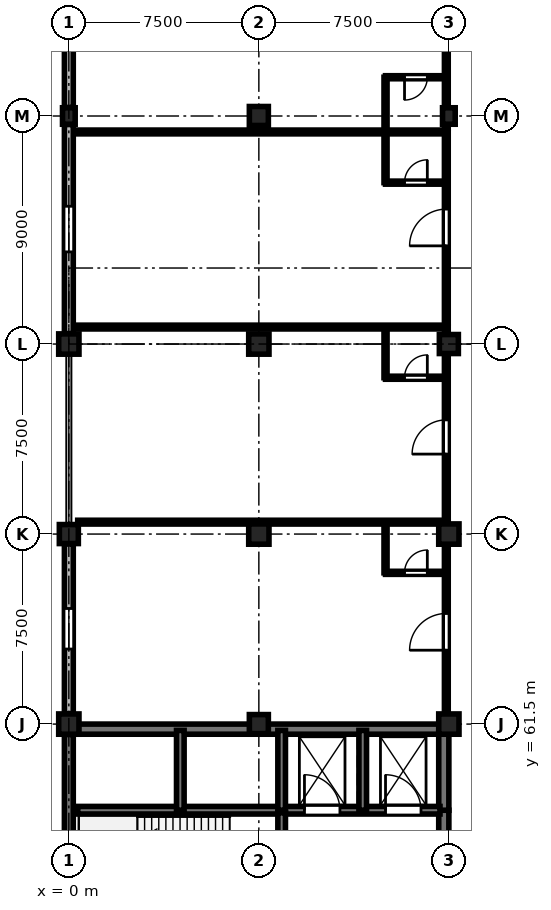
"""IFC4 building model, lengths in metres.
Left out: names, types, materials, properties, quantities, classifications, styles, units other than length and angle.
Written with IfcOpenShell. Run it as: python <this file> out.ifc"""

import sys

from ifc_helpers import new_model, si_unit, direction, frame, frame_2d, origin, origin_2d, place, context, subcontext, project, spatial, rectangle, circle, extrude, element, fill, save


model = new_model("IFC4")
c1 = context("Model", 3, precision=1e-05, world=origin(), true_north=direction((0.0, 1.0)))
c2 = subcontext(c1, "Body", "Model", "MODEL_VIEW")
j1 = project(units=[si_unit("LENGTHUNIT", "METRE"), si_unit("PLANEANGLEUNIT", "RADIAN")], contexts=[c1])
p1 = place(None, origin())
s1 = spatial("IfcSite", under=j1, at=p1, CompositionType="ELEMENT")
p2 = place(p1, origin())
s2 = spatial("IfcBuilding", under=s1, at=p2, CompositionType="ELEMENT")
p3 = place(p2, frame((0.0, 0.0, 9.3)))
s3 = spatial("IfcBuildingStorey", under=s2, at=p3, CompositionType="ELEMENT", Elevation=9.3)
p4 = place(p3, frame((0.0, 61.5, 0.0), z_axis=(0.0, 0.0, 1.0), x_axis=(1.0, 0.0, 0.0)))
e1 = element("IfcColumn", 1, at=p4, inside=s3, PredefinedType="COLUMN", context=c2, shape_type="SweptSolid", body=[
    extrude(rectangle(XDim=0.8, YDim=0.8, at=origin_2d()), origin(), (0.0, 0.0, 1.0), 4.8),
])
p5 = place(p3, frame((0.0, 69.0, 0.0), z_axis=(0.0, 0.0, 1.0), x_axis=(1.0, 0.0, 0.0)))
e2 = element("IfcColumn", 2, at=p5, inside=s3, PredefinedType="COLUMN", context=c2, shape_type="SweptSolid", body=[
    extrude(circle(Radius=0.375, at=origin_2d()), origin(), (0.0, 0.0, 1.0), 4.8),
])
p6 = place(p3, frame((0.0, 76.5, 0.0), z_axis=(0.0, 0.0, 1.0), x_axis=(1.0, 0.0, 0.0)))
e3 = element("IfcColumn", 3, at=p6, inside=s3, PredefinedType="COLUMN", context=c2, shape_type="SweptSolid", body=[
    extrude(rectangle(XDim=0.8, YDim=0.8, at=origin_2d()), origin(), (0.0, 0.0, 1.0), 4.8),
])
p7 = place(p3, frame((0.0, 85.5, 0.0), z_axis=(0.0, 0.0, 1.0), x_axis=(1.0, 0.0, 0.0)))
e4 = element("IfcColumn", 4, at=p7, inside=s3, PredefinedType="COLUMN", context=c2, shape_type="SweptSolid", body=[
    extrude(rectangle(XDim=0.5, YDim=0.65, at=origin_2d()), origin(), (0.0, 0.0, 1.0), 4.8),
])
p8 = place(p3, frame((7.5, 61.5, 0.0), z_axis=(0.0, 0.0, 1.0), x_axis=(1.0, 0.0, 0.0)))
e5 = element("IfcColumn", 5, at=p8, inside=s3, PredefinedType="COLUMN", context=c2, shape_type="SweptSolid", body=[
    extrude(circle(Radius=0.375, at=origin_2d()), origin(), (0.0, 0.0, 1.0), 4.8),
])
for number, where, z_axis, x_axis in (
    (6, (7.5, 69.0, 0.0), (0.0, 0.0, 1.0), (1.0, 0.0, 0.0)),
    (7, (7.5, 76.5, 0.0), (0.0, 0.0, 1.0), (1.0, 0.0, 0.0)),
):
    element("IfcColumn", number, at=place(p3, frame(where, z_axis=z_axis, x_axis=x_axis)), inside=s3, PredefinedType="COLUMN", context=c2, shape_type="SweptSolid", body=[
        extrude(rectangle(XDim=0.8, YDim=0.8, at=origin_2d()), origin(), (0.0, 0.0, 1.0), 4.8),
    ])
p9 = place(p3, frame((7.5, 85.5, 0.0), z_axis=(0.0, 0.0, 1.0), x_axis=(1.0, 0.0, 0.0)))
e8 = element("IfcColumn", 8, at=p9, inside=s3, PredefinedType="COLUMN", context=c2, shape_type="SweptSolid", body=[
    extrude(rectangle(XDim=0.75, YDim=0.75, at=origin_2d()), origin(), (0.0, 0.0, 1.0), 4.8),
])
for number, where, z_axis, x_axis in (
    (9, (15.0, 61.5, 0.0), (0.0, 0.0, 1.0), (1.0, 0.0, 0.0)),
    (10, (15.0, 69.0, 0.0), (0.0, 0.0, 1.0), (1.0, 0.0, 0.0)),
):
    element("IfcColumn", number, at=place(p3, frame(where, z_axis=z_axis, x_axis=x_axis)), inside=s3, PredefinedType="COLUMN", context=c2, shape_type="SweptSolid", body=[
        extrude(rectangle(XDim=0.8, YDim=0.8, at=origin_2d()), origin(), (0.0, 0.0, 1.0), 4.8),
    ])
p10 = place(p3, frame((15.0, 76.5, 0.0), z_axis=(0.0, 0.0, 1.0), x_axis=(1.0, 0.0, 0.0)))
e11 = element("IfcColumn", 11, at=p10, inside=s3, PredefinedType="COLUMN", context=c2, shape_type="SweptSolid", body=[
    extrude(circle(Radius=0.375, at=origin_2d()), origin(), (0.0, 0.0, 1.0), 4.8),
])
p11 = place(p3, frame((15.0, 85.5, 0.0), z_axis=(0.0, 0.0, 1.0), x_axis=(1.0, 0.0, 0.0)))
e12 = element("IfcColumn", 12, at=p11, inside=s3, PredefinedType="COLUMN", context=c2, shape_type="SweptSolid", body=[
    extrude(rectangle(XDim=0.5, YDim=0.65, at=origin_2d()), origin(), (0.0, 0.0, 1.0), 4.8),
])
p12 = place(p3, frame((0.0, 54.41, 0.0), z_axis=(0.0, 0.0, 1.0), x_axis=(0.0, 1.0, 0.0)))
e13 = element("IfcWall", 13, at=p12, inside=s3, PredefinedType="SHEAR", context=c2, shape_type="SweptSolid", body=[
    extrude(rectangle(XDim=6.68, YDim=0.35, at=frame_2d((3.34, 0.0))), origin(), (0.0, 0.0, 1.0), 4.55),
])
p13 = place(p3, frame((0.0, 61.91, 0.0), z_axis=(0.0, 0.0, 1.0), x_axis=(0.0, 1.0, 0.0)))
e14 = element("IfcWall", 14, at=p13, inside=s3, PredefinedType="STANDARD", context=c2, shape_type="SweptSolid", body=[
    extrude(rectangle(XDim=6.705, YDim=0.35, at=frame_2d((3.353, 0.0))), origin(), (0.0, 0.0, 1.0), 3.95),
])
p14 = place(p13, frame((2.552, 0.0, 0.9)))
e15 = element("IfcOpeningElement", 15, at=p14, cuts=e14, PredefinedType="OPENING", context=c2, shape_type="SweptSolid", body=[
    extrude(rectangle(XDim=1.6, YDim=1.8, at=frame_2d((0.8, 0.9))), frame((0.0, 0.185, 0.0), z_axis=(0.0, -1.0, 0.0), x_axis=(1.0, 0.0, 0.0)), (0.0, 0.0, 1.0), 0.37),
])
p15 = place(p3, frame((0.0, 76.91, 0.0), z_axis=(0.0, 0.0, 1.0), x_axis=(0.0, 1.0, 0.0)))
e16 = element("IfcWall", 16, at=p15, inside=s3, PredefinedType="STANDARD", context=c2, shape_type="SweptSolid", body=[
    extrude(rectangle(XDim=8.255, YDim=0.35, at=frame_2d((4.127, 0.0))), origin(), (0.0, 0.0, 1.0), 4.0),
])
p16 = place(p15, frame((3.228, 0.0, 0.9)))
e17 = element("IfcOpeningElement", 17, at=p16, cuts=e16, PredefinedType="OPENING", context=c2, shape_type="SweptSolid", body=[
    extrude(rectangle(XDim=1.8, YDim=2.4, at=frame_2d((0.9, 1.2))), frame((0.0, 0.185, 0.0), z_axis=(0.0, -1.0, 0.0), x_axis=(1.0, 0.0, 0.0)), (0.0, 0.0, 1.0), 0.37),
])
p17 = place(p3, frame((0.0, 85.835, 0.0), z_axis=(0.0, 0.0, 1.0), x_axis=(0.0, 1.0, 0.0)))
e18 = element("IfcWall", 18, at=p17, inside=s3, PredefinedType="STANDARD", context=c2, shape_type="SweptSolid", body=[
    extrude(rectangle(XDim=6.805, YDim=0.35, at=frame_2d((3.402, 0.0))), origin(), (0.0, 0.0, 1.0), 3.95),
])
p18 = place(p17, frame((2.653, 0.0, 0.9)))
e19 = element("IfcOpeningElement", 19, at=p18, cuts=e18, PredefinedType="OPENING", context=c2, shape_type="SweptSolid", body=[
    extrude(rectangle(XDim=1.5, YDim=2.4, at=frame_2d((0.75, 1.2))), frame((0.0, 0.185, 0.0), z_axis=(0.0, -1.0, 0.0), x_axis=(1.0, 0.0, 0.0)), (0.0, 0.0, 1.0), 0.37),
])
p19 = place(p3, frame((0.35, 61.3, 0.0), z_axis=(0.0, 0.0, 1.0), x_axis=(1.0, 0.0, 0.0)))
e20 = element("IfcWall", 20, at=p19, inside=s3, PredefinedType="SHEAR", context=c2, shape_type="SweptSolid", body=[
    extrude(rectangle(XDim=14.3, YDim=0.4, at=frame_2d((7.15, 0.0))), origin(), (0.0, 0.0, 1.0), 4.55),
])
p20 = place(p3, frame((14.8, 54.35, 0.0), z_axis=(0.0, 0.0, 1.0), x_axis=(0.0, 1.0, 0.0)))
e21 = element("IfcWall", 21, at=p20, inside=s3, PredefinedType="SHEAR", context=c2, shape_type="SweptSolid", body=[
    extrude(rectangle(XDim=3.75, YDim=0.4, at=frame_2d((1.875, 0.0))), origin(), (0.0, 0.0, 1.0), 4.55),
])
p21 = place(p3, frame((14.8, 58.1, 0.0), z_axis=(0.0, 0.0, 1.0), x_axis=(0.0, 1.0, 0.0)))
e22 = element("IfcWall", 22, at=p21, inside=s3, PredefinedType="SHEAR", context=c2, shape_type="SweptSolid", body=[
    extrude(rectangle(XDim=3.05, YDim=0.4, at=frame_2d((1.525, 0.0))), origin(), (0.0, 0.0, 1.0), 4.55),
])
p22 = place(p3, frame((0.35, 58.1, 0.0), z_axis=(0.0, 0.0, 1.0), x_axis=(1.0, 0.0, 0.0)))
e23 = element("IfcWall", 23, at=p22, inside=s3, PredefinedType="SHEAR", context=c2, shape_type="SweptSolid", body=[
    extrude(rectangle(XDim=8.05, YDim=0.3, at=frame_2d((4.025, 0.0))), origin(), (0.0, 0.0, 1.0), 4.55),
])
p23 = place(p3, frame((8.4, 58.1, 0.0), z_axis=(0.0, 0.0, 1.0), x_axis=(1.0, 0.0, 0.0)))
e24 = element("IfcWall", 24, at=p23, inside=s3, PredefinedType="SHEAR", context=c2, shape_type="SweptSolid", body=[
    extrude(rectangle(XDim=6.25, YDim=0.3, at=frame_2d((3.125, 0.0))), origin(), (0.0, 0.0, 1.0), 4.55),
])
p24 = place(p23, frame((0.9, 0.0, 0.0)))
e25 = element("IfcOpeningElement", 25, at=p24, cuts=e24, PredefinedType="OPENING", context=c2, shape_type="SweptSolid", body=[
    extrude(rectangle(XDim=1.4, YDim=2.25, at=frame_2d((0.7, 1.125))), frame((0.0, 0.16, 0.0), z_axis=(0.0, -1.0, 0.0), x_axis=(1.0, 0.0, 0.0)), (0.0, 0.0, 1.0), 0.32),
])
p25 = place(p23, frame((4.1, 0.0, 0.0)))
e26 = element("IfcOpeningElement", 26, at=p25, cuts=e24, PredefinedType="OPENING", context=c2, shape_type="SweptSolid", body=[
    extrude(rectangle(XDim=1.4, YDim=2.25, at=frame_2d((0.7, 1.125))), frame((0.0, 0.16, 0.0), z_axis=(0.0, -1.0, 0.0), x_axis=(1.0, 0.0, 0.0)), (0.0, 0.0, 1.0), 0.32),
])
p26 = place(p3, frame((8.4, 58.0, 0.0), z_axis=(0.0, 0.0, 1.0), x_axis=(0.0, -1.0, 0.0)))
e27 = element("IfcWall", 27, at=p26, inside=s3, PredefinedType="SHEAR", context=c2, shape_type="SweptSolid", body=[
    extrude(rectangle(XDim=3.65, YDim=0.3, at=frame_2d((1.825, 0.0))), origin(), (0.0, 0.0, 1.0), 4.55),
])
p27 = place(p26, frame((1.22, 0.0, 0.0)))
e28 = element("IfcOpeningElement", 28, at=p27, cuts=e27, PredefinedType="OPENING", context=c2, shape_type="SweptSolid", body=[
    extrude(rectangle(XDim=1.2, YDim=2.25, at=frame_2d((0.6, 1.125))), frame((0.0, 0.16, 0.0), z_axis=(0.0, -1.0, 0.0), x_axis=(1.0, 0.0, 0.0)), (0.0, 0.0, 1.0), 0.32),
])
for number, where, z_axis, x_axis in (
    (29, (4.4, 58.1, 0.0), (0.0, 0.0, 1.0), (0.0, 1.0, 0.0)),
    (30, (8.4, 58.1, 0.0), (0.0, 0.0, 1.0), (0.0, 1.0, 0.0)),
    (31, (11.6, 58.1, 0.0), (0.0, 0.0, 1.0), (0.0, 1.0, 0.0)),
):
    element("IfcWall", number, at=place(p3, frame(where, z_axis=z_axis, x_axis=x_axis)), inside=s3, PredefinedType="SHEAR", context=c2, shape_type="SweptSolid", body=[
        extrude(rectangle(XDim=3.15, YDim=0.3, at=frame_2d((1.575, 0.0))), origin(), (0.0, 0.0, 1.0), 4.55),
    ])
p28 = place(p3, frame((14.9, 61.93, 0.0), z_axis=(0.0, 0.0, 1.0), x_axis=(0.0, 1.0, 0.0)))
e32 = element("IfcWall", 32, at=p28, inside=s3, PredefinedType="PARTITIONING", context=c2, shape_type="SweptSolid", body=[
    extrude(rectangle(XDim=7.54, YDim=0.15, at=frame_2d((3.77, 0.0))), origin(), (0.0, 0.0, 1.0), 3.985),
])
p29 = place(p28, frame((2.486, 0.0, 0.0)))
e33 = element("IfcOpeningElement", 33, at=p29, cuts=e32, PredefinedType="OPENING", context=c2, shape_type="SweptSolid", body=[
    extrude(rectangle(XDim=1.45, YDim=2.3, at=frame_2d((0.725, 1.15))), frame((0.0, 0.085, 0.0), z_axis=(0.0, -1.0, 0.0), x_axis=(1.0, 0.0, 0.0)), (0.0, 0.0, 1.0), 0.17),
])
p30 = place(p3, frame((12.5, 67.47, 0.0), z_axis=(0.0, 0.0, 1.0), x_axis=(1.0, 0.0, 0.0)))
e34 = element("IfcWall", 34, at=p30, inside=s3, PredefinedType="PARTITIONING", context=c2, shape_type="SweptSolid", body=[
    extrude(rectangle(XDim=2.4, YDim=0.12, at=frame_2d((1.2, 0.0))), origin(), (0.0, 0.0, 1.0), 4.535),
])
p31 = place(p30, frame((0.75, 0.0, 0.0)))
e35 = element("IfcOpeningElement", 35, at=p31, cuts=e34, PredefinedType="OPENING", context=c2, shape_type="SweptSolid", body=[
    extrude(rectangle(XDim=0.9, YDim=2.1, at=frame_2d((0.45, 1.05))), frame((0.0, 0.07, 0.0), z_axis=(0.0, -1.0, 0.0), x_axis=(1.0, 0.0, 0.0)), (0.0, 0.0, 1.0), 0.14),
])
p32 = place(p3, frame((12.5, 67.47, 0.0), z_axis=(0.0, 0.0, 1.0), x_axis=(0.0, 1.0, 0.0)))
e36 = element("IfcWall", 36, at=p32, inside=s3, PredefinedType="PARTITIONING", context=c2, shape_type="SweptSolid", body=[
    extrude(rectangle(XDim=2.0, YDim=0.12, at=frame_2d((1.0, 0.0))), origin(), (0.0, 0.0, 1.0), 4.535),
])
p33 = place(p3, frame((14.9, 69.63, 0.0), z_axis=(0.0, 0.0, 1.0), x_axis=(0.0, 1.0, 0.0)))
e37 = element("IfcWall", 37, at=p33, inside=s3, PredefinedType="PARTITIONING", context=c2, shape_type="SweptSolid", body=[
    extrude(rectangle(XDim=7.54, YDim=0.15, at=frame_2d((3.77, 0.0))), origin(), (0.0, 0.0, 1.0), 3.835),
])
p34 = place(p33, frame((2.526, 0.0, 0.0)))
e38 = element("IfcOpeningElement", 38, at=p34, cuts=e37, PredefinedType="OPENING", context=c2, shape_type="SweptSolid", body=[
    extrude(rectangle(XDim=1.35, YDim=2.25, at=frame_2d((0.675, 1.125))), frame((0.0, 0.085, 0.0), z_axis=(0.0, -1.0, 0.0), x_axis=(1.0, 0.0, 0.0)), (0.0, 0.0, 1.0), 0.17),
])
p35 = place(p3, frame((12.5, 75.17, 0.0), z_axis=(0.0, 0.0, 1.0), x_axis=(1.0, 0.0, 0.0)))
e39 = element("IfcWall", 39, at=p35, inside=s3, PredefinedType="PARTITIONING", context=c2, shape_type="SweptSolid", body=[
    extrude(rectangle(XDim=2.4, YDim=0.12, at=frame_2d((1.2, 0.0))), origin(), (0.0, 0.0, 1.0), 4.535),
])
p36 = place(p35, frame((0.75, 0.0, 0.0)))
e40 = element("IfcOpeningElement", 40, at=p36, cuts=e39, PredefinedType="OPENING", context=c2, shape_type="SweptSolid", body=[
    extrude(rectangle(XDim=0.9, YDim=2.1, at=frame_2d((0.45, 1.05))), frame((0.0, 0.07, 0.0), z_axis=(0.0, -1.0, 0.0), x_axis=(1.0, 0.0, 0.0)), (0.0, 0.0, 1.0), 0.14),
])
p37 = place(p3, frame((12.5, 75.17, 0.0), z_axis=(0.0, 0.0, 1.0), x_axis=(0.0, 1.0, 0.0)))
e41 = element("IfcWall", 41, at=p37, inside=s3, PredefinedType="PARTITIONING", context=c2, shape_type="SweptSolid", body=[
    extrude(rectangle(XDim=2.0, YDim=0.12, at=frame_2d((1.0, 0.0))), origin(), (0.0, 0.0, 1.0), 4.535),
])
p38 = place(p3, frame((14.9, 77.33, 0.0), z_axis=(0.0, 0.0, 1.0), x_axis=(0.0, 1.0, 0.0)))
e42 = element("IfcWall", 42, at=p38, inside=s3, PredefinedType="PARTITIONING", context=c2, shape_type="SweptSolid", body=[
    extrude(rectangle(XDim=7.54, YDim=0.15, at=frame_2d((3.77, 0.0))), origin(), (0.0, 0.0, 1.0), 3.835),
])
p39 = place(p38, frame((3.045, 0.0, 0.0)))
e43 = element("IfcOpeningElement", 43, at=p39, cuts=e42, PredefinedType="OPENING", context=c2, shape_type="SweptSolid", body=[
    extrude(rectangle(XDim=1.45, YDim=2.3, at=frame_2d((0.725, 1.15))), frame((0.0, 0.085, 0.0), z_axis=(0.0, -1.0, 0.0), x_axis=(1.0, 0.0, 0.0)), (0.0, 0.0, 1.0), 0.17),
])
p40 = place(p3, frame((12.5, 82.87, 0.0), z_axis=(0.0, 0.0, 1.0), x_axis=(1.0, 0.0, 0.0)))
e44 = element("IfcWall", 44, at=p40, inside=s3, PredefinedType="PARTITIONING", context=c2, shape_type="SweptSolid", body=[
    extrude(rectangle(XDim=2.4, YDim=0.12, at=frame_2d((1.2, 0.0))), origin(), (0.0, 0.0, 1.0), 4.535),
])
p41 = place(p40, frame((0.75, 0.0, 0.0)))
e45 = element("IfcOpeningElement", 45, at=p41, cuts=e44, PredefinedType="OPENING", context=c2, shape_type="SweptSolid", body=[
    extrude(rectangle(XDim=0.9, YDim=2.1, at=frame_2d((0.45, 1.05))), frame((0.0, 0.07, 0.0), z_axis=(0.0, -1.0, 0.0), x_axis=(1.0, 0.0, 0.0)), (0.0, 0.0, 1.0), 0.14),
])
p42 = place(p3, frame((12.5, 82.87, 0.0), z_axis=(0.0, 0.0, 1.0), x_axis=(0.0, 1.0, 0.0)))
e46 = element("IfcWall", 46, at=p42, inside=s3, PredefinedType="PARTITIONING", context=c2, shape_type="SweptSolid", body=[
    extrude(rectangle(XDim=2.0, YDim=0.12, at=frame_2d((1.0, 0.0))), origin(), (0.0, 0.0, 1.0), 4.535),
])
p43 = place(p3, frame((14.9, 85.03, 0.0), z_axis=(0.0, 0.0, 1.0), x_axis=(0.0, 1.0, 0.0)))
e47 = element("IfcWall", 47, at=p43, inside=s3, PredefinedType="PARTITIONING", context=c2, shape_type="SweptSolid", body=[
    extrude(rectangle(XDim=7.54, YDim=0.15, at=frame_2d((3.77, 0.0))), origin(), (0.0, 0.0, 1.0), 3.835),
])
p44 = place(p43, frame((3.664, 0.0, 0.0)))
e48 = element("IfcOpeningElement", 48, at=p44, cuts=e47, PredefinedType="OPENING", context=c2, shape_type="SweptSolid", body=[
    extrude(rectangle(XDim=1.35, YDim=2.25, at=frame_2d((0.675, 1.125))), frame((0.0, 0.085, 0.0), z_axis=(0.0, -1.0, 0.0), x_axis=(1.0, 0.0, 0.0)), (0.0, 0.0, 1.0), 0.17),
])
p45 = place(p3, frame((14.9, 87.03, 0.0), z_axis=(0.0, 0.0, 1.0), x_axis=(-1.0, 0.0, 0.0)))
e49 = element("IfcWall", 49, at=p45, inside=s3, PredefinedType="PARTITIONING", context=c2, shape_type="SweptSolid", body=[
    extrude(rectangle(XDim=2.4, YDim=0.12, at=frame_2d((1.2, 0.0))), origin(), (0.0, 0.0, 1.0), 4.535),
])
p46 = place(p45, frame((0.75, 0.0, 0.0)))
e50 = element("IfcOpeningElement", 50, at=p46, cuts=e49, PredefinedType="OPENING", context=c2, shape_type="SweptSolid", body=[
    extrude(rectangle(XDim=0.9, YDim=2.1, at=frame_2d((0.45, 1.05))), frame((0.0, 0.07, 0.0), z_axis=(0.0, -1.0, 0.0), x_axis=(1.0, 0.0, 0.0)), (0.0, 0.0, 1.0), 0.14),
])
p47 = place(p3, frame((12.5, 85.03, 0.0), z_axis=(0.0, 0.0, 1.0), x_axis=(0.0, 1.0, 0.0)))
e51 = element("IfcWall", 51, at=p47, inside=s3, PredefinedType="PARTITIONING", context=c2, shape_type="SweptSolid", body=[
    extrude(rectangle(XDim=2.0, YDim=0.12, at=frame_2d((1.0, 0.0))), origin(), (0.0, 0.0, 1.0), 4.535),
])
for number, where, z_axis, x_axis in (
    (52, (0.35, 69.47, 0.0), (0.0, 0.0, 1.0), (1.0, 0.0, 0.0)),
    (53, (0.35, 77.17, 0.0), (0.0, 0.0, 1.0), (1.0, 0.0, 0.0)),
    (54, (0.35, 84.87, 0.0), (0.0, 0.0, 1.0), (1.0, 0.0, 0.0)),
):
    element("IfcWall", number, at=place(p3, frame(where, z_axis=z_axis, x_axis=x_axis)), inside=s3, PredefinedType="PARTITIONING", context=c2, shape_type="SweptSolid", body=[
        extrude(rectangle(XDim=14.55, YDim=0.15, at=frame_2d((7.275, 0.0))), origin(), (0.0, 0.0, 1.0), 4.535),
    ])
p48 = place(p14, origin())
e55 = element("IfcWindow", 55, at=p48, inside=s3, PartitioningType="SINGLE_PANEL", PredefinedType="WINDOW", context=c2, shape_type="SweptSolid", body=[
    extrude(rectangle(XDim=1.6, YDim=1.8, at=frame_2d((0.8, 0.9))), frame((0.0, 0.03, 0.0), z_axis=(0.0, -1.0, 0.0), x_axis=(1.0, 0.0, 0.0)), (0.0, 0.0, 1.0), 0.06),
])
fill(e15, e55)
p49 = place(p16, origin())
e56 = element("IfcWindow", 56, at=p49, inside=s3, PartitioningType="SINGLE_PANEL", PredefinedType="WINDOW", context=c2, shape_type="SweptSolid", body=[
    extrude(rectangle(XDim=1.8, YDim=2.4, at=frame_2d((0.9, 1.2))), frame((0.0, 0.03, 0.0), z_axis=(0.0, -1.0, 0.0), x_axis=(1.0, 0.0, 0.0)), (0.0, 0.0, 1.0), 0.06),
])
fill(e17, e56)
p50 = place(p24, origin())
e57 = element("IfcDoor", 57, at=p50, inside=s3, OperationType="DOUBLE_DOOR_SLIDING", PredefinedType="DOOR", context=c2, shape_type="SweptSolid", body=[
    extrude(rectangle(XDim=1.4, YDim=2.25, at=frame_2d((0.7, 1.125))), frame((0.0, 0.025, 0.0), z_axis=(0.0, -1.0, 0.0), x_axis=(1.0, 0.0, 0.0)), (0.0, 0.0, 1.0), 0.05),
])
fill(e25, e57)
p51 = place(p25, origin())
e58 = element("IfcDoor", 58, at=p51, inside=s3, OperationType="DOUBLE_DOOR_SLIDING", PredefinedType="DOOR", context=c2, shape_type="SweptSolid", body=[
    extrude(rectangle(XDim=1.4, YDim=2.25, at=frame_2d((0.7, 1.125))), frame((0.0, 0.025, 0.0), z_axis=(0.0, -1.0, 0.0), x_axis=(1.0, 0.0, 0.0)), (0.0, 0.0, 1.0), 0.05),
])
fill(e26, e58)
p52 = place(p29, origin())
e59 = element("IfcDoor", 59, at=p52, inside=s3, OperationType="SINGLE_SWING_LEFT", PredefinedType="DOOR", context=c2, shape_type="SweptSolid", body=[
    extrude(rectangle(XDim=1.45, YDim=2.3, at=frame_2d((0.725, 1.15))), frame((0.0, 0.025, 0.0), z_axis=(0.0, -1.0, 0.0), x_axis=(1.0, 0.0, 0.0)), (0.0, 0.0, 1.0), 0.05),
])
fill(e33, e59)
p53 = place(p31, origin())
e60 = element("IfcDoor", 60, at=p53, inside=s3, OperationType="SINGLE_SWING_RIGHT", PredefinedType="DOOR", context=c2, shape_type="SweptSolid", body=[
    extrude(rectangle(XDim=0.9, YDim=2.1, at=frame_2d((0.45, 1.05))), frame((0.0, 0.025, 0.0), z_axis=(0.0, -1.0, 0.0), x_axis=(1.0, 0.0, 0.0)), (0.0, 0.0, 1.0), 0.05),
])
fill(e35, e60)
p54 = place(p34, origin())
e61 = element("IfcDoor", 61, at=p54, inside=s3, OperationType="SINGLE_SWING_LEFT", PredefinedType="DOOR", context=c2, shape_type="SweptSolid", body=[
    extrude(rectangle(XDim=1.35, YDim=2.25, at=frame_2d((0.675, 1.125))), frame((0.0, 0.025, 0.0), z_axis=(0.0, -1.0, 0.0), x_axis=(1.0, 0.0, 0.0)), (0.0, 0.0, 1.0), 0.05),
])
fill(e38, e61)
p55 = place(p36, origin())
e62 = element("IfcDoor", 62, at=p55, inside=s3, OperationType="SINGLE_SWING_RIGHT", PredefinedType="DOOR", context=c2, shape_type="SweptSolid", body=[
    extrude(rectangle(XDim=0.9, YDim=2.1, at=frame_2d((0.45, 1.05))), frame((0.0, 0.025, 0.0), z_axis=(0.0, -1.0, 0.0), x_axis=(1.0, 0.0, 0.0)), (0.0, 0.0, 1.0), 0.05),
])
fill(e40, e62)
p56 = place(p39, origin())
e63 = element("IfcDoor", 63, at=p56, inside=s3, OperationType="SINGLE_SWING_LEFT", PredefinedType="DOOR", context=c2, shape_type="SweptSolid", body=[
    extrude(rectangle(XDim=1.45, YDim=2.3, at=frame_2d((0.725, 1.15))), frame((0.0, 0.025, 0.0), z_axis=(0.0, -1.0, 0.0), x_axis=(1.0, 0.0, 0.0)), (0.0, 0.0, 1.0), 0.05),
])
fill(e43, e63)
p57 = place(p41, origin())
e64 = element("IfcDoor", 64, at=p57, inside=s3, OperationType="SINGLE_SWING_RIGHT", PredefinedType="DOOR", context=c2, shape_type="SweptSolid", body=[
    extrude(rectangle(XDim=0.9, YDim=2.1, at=frame_2d((0.45, 1.05))), frame((0.0, 0.025, 0.0), z_axis=(0.0, -1.0, 0.0), x_axis=(1.0, 0.0, 0.0)), (0.0, 0.0, 1.0), 0.05),
])
fill(e45, e64)
p58 = place(p46, origin())
e65 = element("IfcDoor", 65, at=p58, inside=s3, OperationType="SINGLE_SWING_RIGHT", PredefinedType="DOOR", context=c2, shape_type="SweptSolid", body=[
    extrude(rectangle(XDim=0.9, YDim=2.1, at=frame_2d((0.45, 1.05))), frame((0.0, 0.025, 0.0), z_axis=(0.0, -1.0, 0.0), x_axis=(1.0, 0.0, 0.0)), (0.0, 0.0, 1.0), 0.05),
])
fill(e50, e65)
save(model, sys.argv[1])
